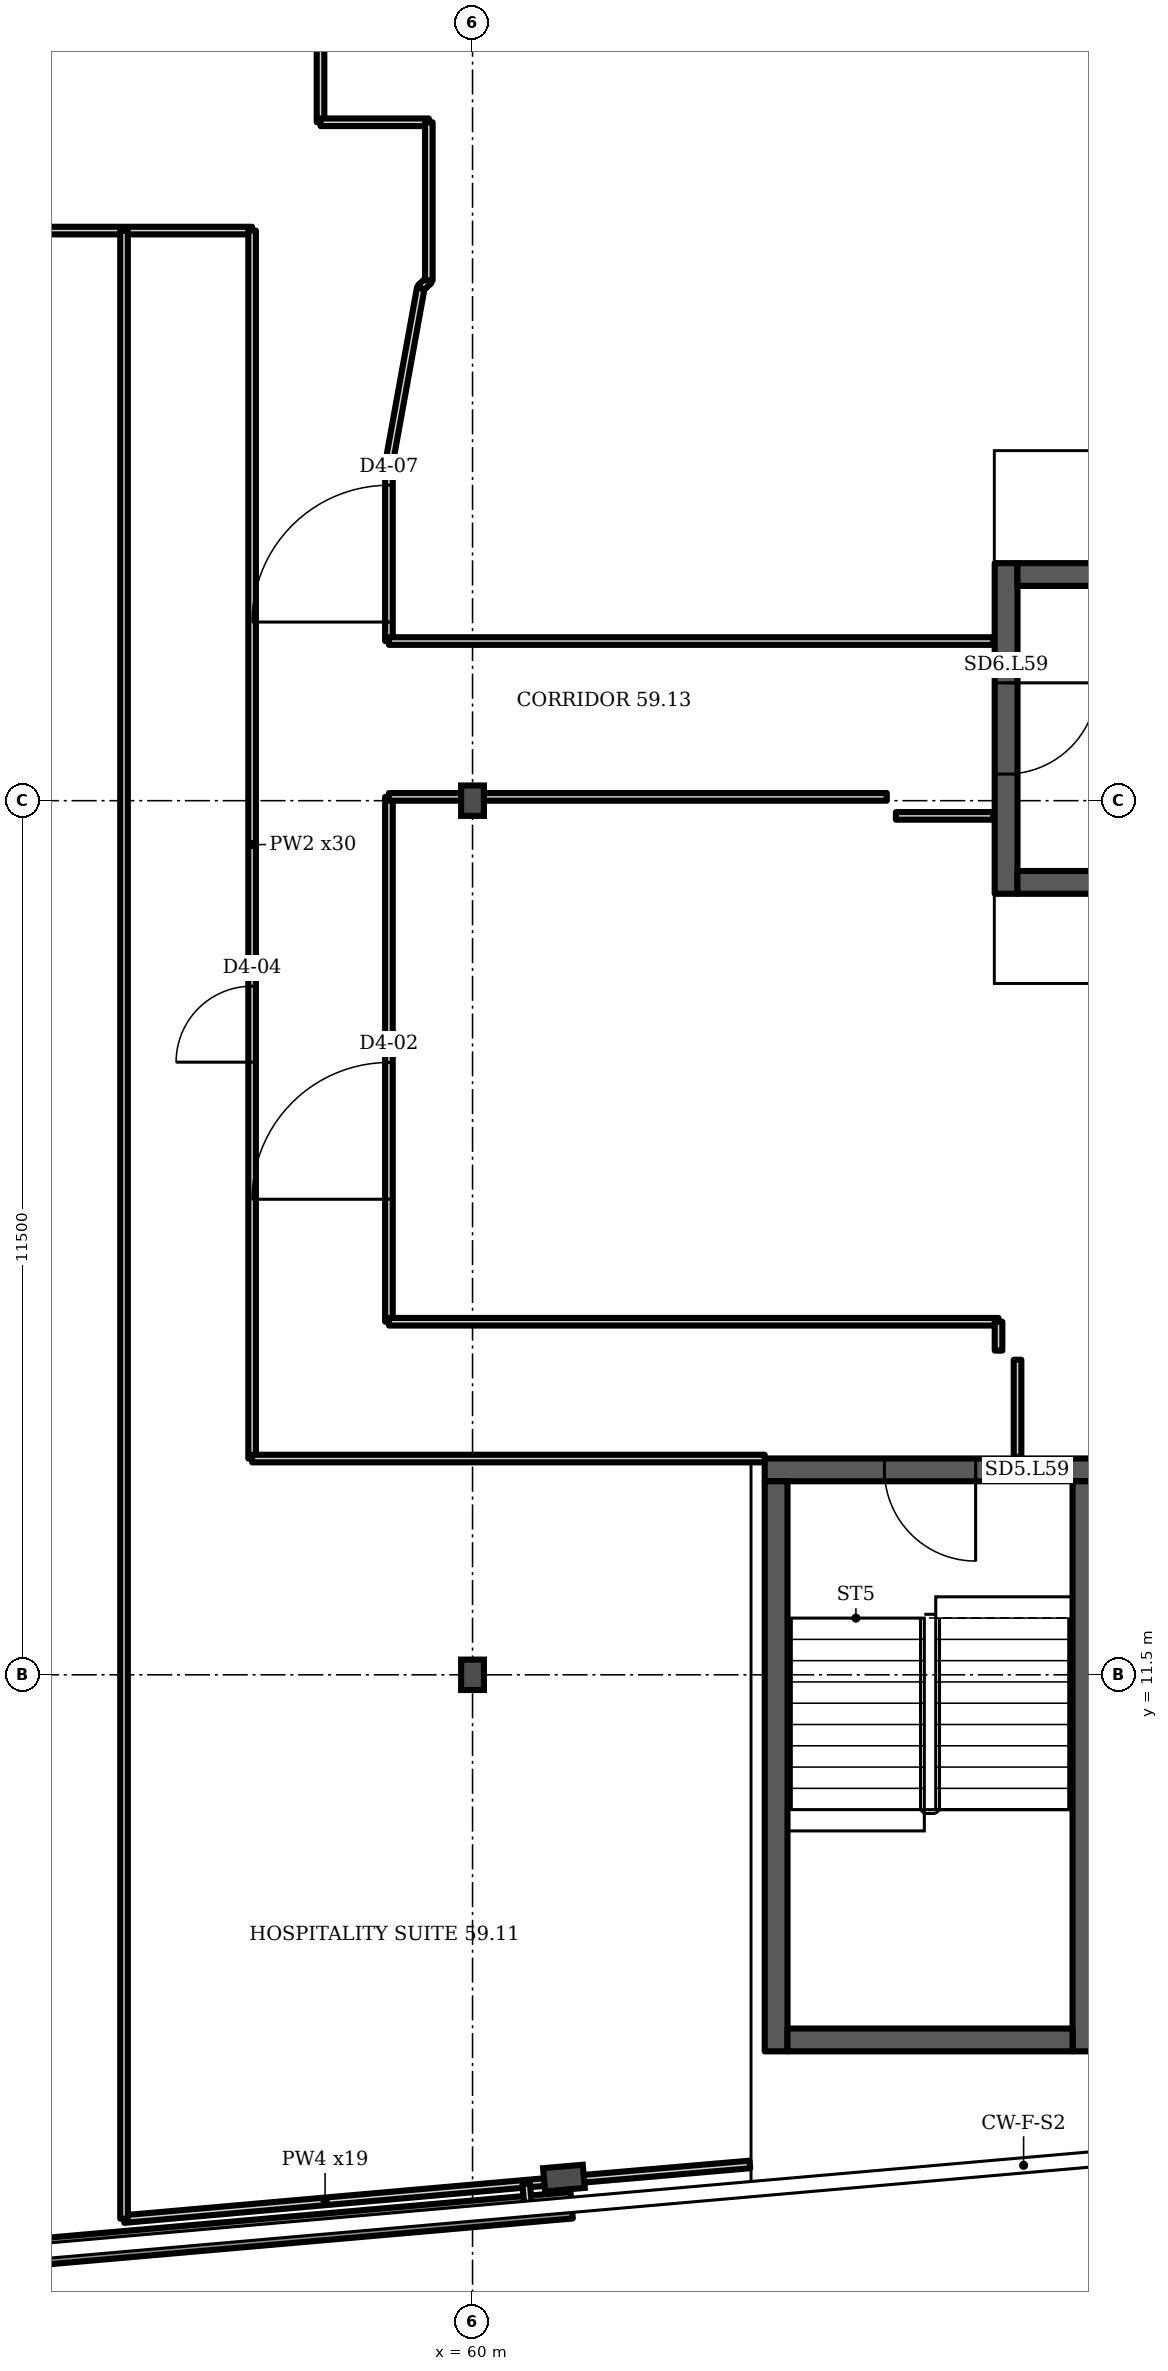
"""IFC4 building model, lengths in metres.
Left out: names, types, materials, properties, quantities, classifications, styles, units other than length and angle.
Written with IfcOpenShell. Run it as: python <this file> out.ifc"""

import sys

from ifc_helpers import new_model, si_unit, direction, frame, frame_2d, origin, origin_2d, place, context, subcontext, project, spatial, rectangle, i_section, extrude, element, fill, save


model = new_model("IFC4")
c1 = context("Model", 3, precision=1e-05, world=origin(), true_north=direction((0.0, 1.0)))
c2 = subcontext(c1, "Body", "Model", "MODEL_VIEW")
j1 = project(units=[si_unit("LENGTHUNIT", "METRE"), si_unit("PLANEANGLEUNIT", "RADIAN")], contexts=[c1])
p1 = place(None, origin())
s1 = spatial("IfcSite", under=j1, at=p1, CompositionType="ELEMENT")
p2 = place(p1, origin())
s2 = spatial("IfcBuilding", under=s1, at=p2, CompositionType="ELEMENT")
p3 = place(p2, frame((0.0, 0.0, 235.9)))
s3 = spatial("IfcBuildingStorey", under=s2, at=p3, CompositionType="ELEMENT", Elevation=235.9)
p4 = place(p3, frame((61.202, 4.879, 0.0), z_axis=(0.0, 0.0, 1.0), x_axis=(0.087156, -0.996197, 0.0)))
e1 = element("IfcColumn", 1, at=p4, inside=s3, PredefinedType="COLUMN", context=c2, shape_type="SweptSolid", body=[
    extrude(i_section(OverallWidth=0.306, OverallDepth=0.524, WebThickness=0.021, FlangeThickness=0.04, FilletRadius=0.027, at=origin_2d()), origin(), (0.0, 0.0, 1.0), 3.6),
])
for number, where, z_axis, x_axis in (
    (2, (60.0, 11.5, 0.0), (0.0, 0.0, 1.0), (1.0, 0.0, 0.0)),
    (3, (60.0, 23.0, 0.0), (0.0, 0.0, 1.0), (1.0, 0.0, 0.0)),
):
    element("IfcColumn", number, at=place(p3, frame(where, z_axis=z_axis, x_axis=x_axis)), inside=s3, PredefinedType="COLUMN", context=c2, shape_type="SweptSolid", body=[
        extrude(i_section(OverallWidth=0.3, OverallDepth=0.4, WebThickness=0.013, FlangeThickness=0.024, FilletRadius=0.027, at=origin_2d()), origin(), (0.0, 0.0, 1.0), 3.6),
    ])
p5 = place(p3, frame((49.545, 3.493, 0.0), z_axis=(0.0, 0.0, 1.0), x_axis=(0.996196, 0.087141, 0.0)))
e4 = element("IfcWall", 4, at=p5, inside=s3, PredefinedType="SOLIDWALL", context=c2, shape_type="SweptSolid", body=[
    extrude(rectangle(XDim=11.803, YDim=0.35, at=frame_2d((5.902, 0.0))), origin(), (0.0, 0.0, 1.0), 1.0),
])
p6 = place(p3, frame((63.844, 14.196, 0.0), z_axis=(0.0, 0.0, 1.0), x_axis=(1.0, 0.0, 0.0)))
e5 = element("IfcWall", 5, at=p6, inside=s3, PredefinedType="SHEAR", context=c2, shape_type="SweptSolid", body=[
    extrude(rectangle(XDim=4.35, YDim=0.3, at=frame_2d((2.175, 0.0))), origin(), (0.0, 0.0, 1.0), 3.2),
])
p7 = place(p6, frame((1.575, 0.0, 0.0)))
e6 = element("IfcOpeningElement", 6, at=p7, cuts=e5, PredefinedType="OPENING", context=c2, shape_type="SweptSolid", body=[
    extrude(rectangle(XDim=1.2, YDim=2.1, at=frame_2d((0.6, 1.05))), frame((0.0, 0.16, 0.0), z_axis=(0.0, -1.0, 0.0), x_axis=(1.0, 0.0, 0.0)), (0.0, 0.0, 1.0), 0.32),
])
p8 = place(p3, frame((67.02, 21.775, 0.0), z_axis=(0.0, 0.0, 1.0), x_axis=(0.0, 1.0, 0.0)))
e7 = element("IfcWall", 7, at=p8, inside=s3, PredefinedType="SHEAR", context=c2, shape_type="SweptSolid", body=[
    extrude(rectangle(XDim=4.35, YDim=0.3, at=frame_2d((2.175, 0.0))), origin(), (0.0, 0.0, 1.0), 3.2),
])
p9 = place(p8, frame((1.575, 0.0, 0.0)))
e8 = element("IfcOpeningElement", 8, at=p9, cuts=e7, PredefinedType="OPENING", context=c2, shape_type="SweptSolid", body=[
    extrude(rectangle(XDim=1.2, YDim=2.1, at=frame_2d((0.6, 1.05))), frame((0.0, 0.16, 0.0), z_axis=(0.0, -1.0, 0.0), x_axis=(1.0, 0.0, 0.0)), (0.0, 0.0, 1.0), 0.32),
])
p10 = place(p3, frame((44.15, 30.5, 0.0), z_axis=(0.0, 0.0, 1.0), x_axis=(1.0, 0.0, 0.0)))
e9 = element("IfcWall", 9, at=p10, inside=s3, PredefinedType="PARTITIONING", context=c2, shape_type="SweptSolid", body=[
    extrude(rectangle(XDim=12.95, YDim=0.1, at=frame_2d((6.475, 0.0))), origin(), (0.0, 0.0, 1.0), 3.2),
])
p11 = place(p10, frame((5.17, 0.0, 0.0)))
e10 = element("IfcOpeningElement", 10, at=p11, cuts=e9, PredefinedType="OPENING", context=c2, shape_type="SweptSolid", body=[
    extrude(rectangle(XDim=1.0, YDim=2.1, at=frame_2d((0.5, 1.05))), frame((0.0, 0.06, 0.0), z_axis=(0.0, -1.0, 0.0), x_axis=(1.0, 0.0, 0.0)), (0.0, 0.0, 1.0), 0.12),
])
p12 = place(p3, frame((55.415, 4.34, 0.0), z_axis=(0.0, 0.0, 1.0), x_axis=(0.996159, 0.087534, 0.0)))
e11 = element("IfcWall", 11, at=p12, inside=s3, PredefinedType="PARTITIONING", context=c2, shape_type="SweptSolid", body=[
    extrude(rectangle(XDim=5.31, YDim=0.1, at=frame_2d((2.655, 0.0))), origin(), (0.0, 0.0, 1.0), 2.58),
])
p13 = place(p3, frame((55.415, 4.345, 0.0), z_axis=(0.0, 0.0, 1.0), x_axis=(0.0, 1.0, 0.0)))
e12 = element("IfcWall", 12, at=p13, inside=s3, PredefinedType="PARTITIONING", context=c2, shape_type="SweptSolid", body=[
    extrude(rectangle(XDim=26.155, YDim=0.1, at=frame_2d((13.078, 0.0))), origin(), (0.0, 0.0, 1.0), 3.2),
])
p14 = place(p3, frame((57.1, 14.345, 0.0), z_axis=(0.0, 0.0, 1.0), x_axis=(0.0, 1.0, 0.0)))
e13 = element("IfcWall", 13, at=p14, inside=s3, PredefinedType="PARTITIONING", context=c2, shape_type="SweptSolid", body=[
    extrude(rectangle(XDim=16.155, YDim=0.1, at=frame_2d((8.078, 0.0))), origin(), (0.0, 0.0, 1.0), 3.2),
])
p15 = place(p14, frame((5.215, 0.0, 0.0)))
e14 = element("IfcOpeningElement", 14, at=p15, cuts=e13, PredefinedType="OPENING", context=c2, shape_type="SweptSolid", body=[
    extrude(rectangle(XDim=1.0, YDim=2.1, at=frame_2d((0.5, 1.05))), frame((0.0, 0.06, 0.0), z_axis=(0.0, -1.0, 0.0), x_axis=(1.0, 0.0, 0.0)), (0.0, 0.0, 1.0), 0.12),
])
p16 = place(p3, frame((57.1, 14.345, 0.0), z_axis=(0.0, 0.0, 1.0), x_axis=(1.0, 0.0, 0.0)))
e15 = element("IfcWall", 15, at=p16, inside=s3, PredefinedType="PARTITIONING", context=c2, shape_type="SweptSolid", body=[
    extrude(rectangle(XDim=6.744, YDim=0.1, at=frame_2d((3.372, 0.0))), origin(), (0.0, 0.0, 1.0), 3.2),
])
p17 = place(p3, frame((58.0, 31.925, 0.0), z_axis=(0.0, 0.0, 1.0), x_axis=(0.0, 1.0, 0.0)))
e16 = element("IfcWall", 16, at=p17, inside=s3, PredefinedType="PARTITIONING", context=c2, shape_type="SweptSolid", body=[
    extrude(rectangle(XDim=2.055, YDim=0.1, at=frame_2d((1.027, 0.0))), origin(), (0.0, 0.0, 1.0), 3.2),
])
p18 = place(p3, frame((58.0, 31.925, 0.0), z_axis=(0.0, 0.0, 1.0), x_axis=(1.0, 0.0, 0.0)))
e17 = element("IfcWall", 17, at=p18, inside=s3, PredefinedType="PARTITIONING", context=c2, shape_type="SweptSolid", body=[
    extrude(rectangle(XDim=1.425, YDim=0.1, at=frame_2d((0.712, 0.0))), origin(), (0.0, 0.0, 1.0), 3.2),
])
p19 = place(p3, frame((58.9, 16.145, 0.0), z_axis=(0.0, 0.0, 1.0), x_axis=(0.0, 1.0, 0.0)))
e18 = element("IfcWall", 18, at=p19, inside=s3, PredefinedType="PARTITIONING", context=c2, shape_type="SweptSolid", body=[
    extrude(rectangle(XDim=6.905, YDim=0.1, at=frame_2d((3.453, 0.0))), origin(), (0.0, 0.0, 1.0), 3.2),
])
p20 = place(p19, frame((1.611, 0.0, 0.0)))
e19 = element("IfcOpeningElement", 19, at=p20, cuts=e18, PredefinedType="OPENING", context=c2, shape_type="SweptSolid", body=[
    extrude(rectangle(XDim=1.8, YDim=2.1, at=frame_2d((0.9, 1.05))), frame((0.0, 0.06, 0.0), z_axis=(0.0, -1.0, 0.0), x_axis=(1.0, 0.0, 0.0)), (0.0, 0.0, 1.0), 0.12),
])
p21 = place(p3, frame((58.9, 16.145, 0.0), z_axis=(0.0, 0.0, 1.0), x_axis=(1.0, 0.0, 0.0)))
e20 = element("IfcWall", 20, at=p21, inside=s3, PredefinedType="PARTITIONING", context=c2, shape_type="SweptSolid", body=[
    extrude(rectangle(XDim=8.02, YDim=0.1, at=frame_2d((4.01, 0.0))), origin(), (0.0, 0.0, 1.0), 3.2),
])
p22 = place(p3, frame((58.9, 23.05, 0.0), z_axis=(0.0, 0.0, 1.0), x_axis=(1.0, 0.0, 0.0)))
e21 = element("IfcWall", 21, at=p22, inside=s3, PredefinedType="PARTITIONING", context=c2, shape_type="SweptSolid", body=[
    extrude(rectangle(XDim=6.55, YDim=0.1, at=frame_2d((3.275, 0.0))), origin(), (0.0, 0.0, 1.0), 3.2),
])
p23 = place(p3, frame((58.9, 25.1, 0.0), z_axis=(0.0, 0.0, 1.0), x_axis=(0.0, 1.0, 0.0)))
e22 = element("IfcWall", 22, at=p23, inside=s3, PredefinedType="PARTITIONING", context=c2, shape_type="SweptSolid", body=[
    extrude(rectangle(XDim=2.335, YDim=0.1, at=frame_2d((1.167, 0.0))), origin(), (0.0, 0.0, 1.0), 3.2),
])
p24 = place(p23, frame((0.25, 0.0, 0.0)))
e23 = element("IfcOpeningElement", 23, at=p24, cuts=e22, PredefinedType="OPENING", context=c2, shape_type="SweptSolid", body=[
    extrude(rectangle(XDim=1.8, YDim=2.1, at=frame_2d((0.9, 1.05))), frame((0.0, 0.06, 0.0), z_axis=(0.0, -1.0, 0.0), x_axis=(1.0, 0.0, 0.0)), (0.0, 0.0, 1.0), 0.12),
])
p25 = place(p3, frame((58.9, 25.1, 0.0), z_axis=(0.0, 0.0, 1.0), x_axis=(1.0, 0.0, 0.0)))
e24 = element("IfcWall", 24, at=p25, inside=s3, PredefinedType="PARTITIONING", context=c2, shape_type="SweptSolid", body=[
    extrude(rectangle(XDim=7.95, YDim=0.1, at=frame_2d((3.975, 0.0))), origin(), (0.0, 0.0, 1.0), 3.2),
])
p26 = place(p3, frame((58.9, 27.435, 0.0), z_axis=(0.0, 0.0, 1.0), x_axis=(0.178584, 0.983924, 0.0)))
e25 = element("IfcWall", 25, at=p26, inside=s3, PredefinedType="PARTITIONING", context=c2, shape_type="SweptSolid", body=[
    extrude(rectangle(XDim=2.353, YDim=0.1, at=frame_2d((1.176, 0.0))), origin(), (0.0, 0.0, 1.0), 3.2),
])
p27 = place(p3, frame((59.32, 29.75, 0.0), z_axis=(0.0, 0.0, 1.0), x_axis=(0.741581, 0.670872, 0.0)))
e26 = element("IfcWall", 26, at=p27, inside=s3, PredefinedType="PARTITIONING", context=c2, shape_type="SweptSolid", body=[
    extrude(rectangle(XDim=0.142, YDim=0.1, at=frame_2d((0.071, 0.0))), origin(), (0.0, 0.0, 1.0), 3.2),
])
p28 = place(p3, frame((59.425, 29.845, 0.0), z_axis=(0.0, 0.0, 1.0), x_axis=(0.0, 1.0, 0.0)))
e27 = element("IfcWall", 27, at=p28, inside=s3, PredefinedType="PARTITIONING", context=c2, shape_type="SweptSolid", body=[
    extrude(rectangle(XDim=2.08, YDim=0.1, at=frame_2d((1.04, 0.0))), origin(), (0.0, 0.0, 1.0), 3.2),
])
p29 = place(p3, frame((60.705, 4.805, 0.0), z_axis=(0.0, 0.0, 1.0), x_axis=(0.996324, 0.085692, 0.0)))
e28 = element("IfcWall", 28, at=p29, inside=s3, PredefinedType="PARTITIONING", context=c2, shape_type="SweptSolid", body=[
    extrude(rectangle(XDim=2.955, YDim=0.1, at=frame_2d((1.477, 0.0))), origin(), (0.0, 0.0, 1.0), 2.58),
])
p30 = place(p3, frame((60.733, 4.497, 0.0), z_axis=(0.0, 0.0, 1.0), x_axis=(-0.090037, 0.995936, 0.0)))
e29 = element("IfcWall", 29, at=p30, inside=s3, PredefinedType="PARTITIONING", context=c2, shape_type="SweptSolid", body=[
    extrude(rectangle(XDim=0.309, YDim=0.1, at=frame_2d((0.155, 0.0))), origin(), (0.0, 0.0, 1.0), 3.2),
])
p31 = place(p3, frame((65.57, 22.8, 0.0), z_axis=(0.0, 0.0, 1.0), x_axis=(1.0, 0.0, 0.0)))
e30 = element("IfcWall", 30, at=p31, inside=s3, PredefinedType="PARTITIONING", context=c2, shape_type="SweptSolid", body=[
    extrude(rectangle(XDim=1.28, YDim=0.1, at=frame_2d((0.64, 0.0))), origin(), (0.0, 0.0, 1.0), 3.2),
])
p32 = place(p3, frame((66.92, 15.765, 0.0), z_axis=(0.0, 0.0, 1.0), x_axis=(0.0, 1.0, 0.0)))
e31 = element("IfcWall", 31, at=p32, inside=s3, PredefinedType="PARTITIONING", context=c2, shape_type="SweptSolid", body=[
    extrude(rectangle(XDim=0.38, YDim=0.1, at=frame_2d((0.19, 0.0))), origin(), (0.0, 0.0, 1.0), 3.2),
])
p33 = place(p3, frame((67.17, 14.366, 0.0), z_axis=(0.0, 0.0, 1.0), x_axis=(0.0, 1.0, 0.0)))
e32 = element("IfcWall", 32, at=p33, inside=s3, PredefinedType="PARTITIONING", context=c2, shape_type="SweptSolid", body=[
    extrude(rectangle(XDim=1.279, YDim=0.1, at=frame_2d((0.639, 0.0))), origin(), (0.0, 0.0, 1.0), 3.2),
])
for number, where, z_axis, x_axis in (
    (33, (63.994, 6.546, 0.0), (0.0, 0.0, 1.0), (0.0, 1.0, 0.0)),
    (34, (68.044, 6.546, 0.0), (0.0, 0.0, 1.0), (0.0, 1.0, 0.0)),
):
    element("IfcWall", number, at=place(p3, frame(where, z_axis=z_axis, x_axis=x_axis)), inside=s3, PredefinedType="SHEAR", context=c2, shape_type="SweptSolid", body=[
        extrude(rectangle(XDim=7.5, YDim=0.3, at=frame_2d((3.75, 0.0))), origin(), (0.0, 0.0, 1.0), 3.2),
    ])
p34 = place(p3, frame((64.144, 6.696, 0.0), z_axis=(0.0, 0.0, 1.0), x_axis=(1.0, 0.0, 0.0)))
e35 = element("IfcWall", 35, at=p34, inside=s3, PredefinedType="SHEAR", context=c2, shape_type="SweptSolid", body=[
    extrude(rectangle(XDim=3.75, YDim=0.3, at=frame_2d((1.875, 0.0))), origin(), (0.0, 0.0, 1.0), 3.2),
])
for number, where, z_axis, x_axis in (
    (36, (67.17, 21.925, 0.0), (0.0, 0.0, 1.0), (1.0, 0.0, 0.0)),
    (37, (67.17, 25.975, 0.0), (0.0, 0.0, 1.0), (1.0, 0.0, 0.0)),
):
    element("IfcWall", number, at=place(p3, frame(where, z_axis=z_axis, x_axis=x_axis)), inside=s3, PredefinedType="SHEAR", context=c2, shape_type="SweptSolid", body=[
        extrude(rectangle(XDim=7.5, YDim=0.3, at=frame_2d((3.75, 0.0))), origin(), (0.0, 0.0, 1.0), 3.2),
    ])
p35 = place(p7, origin())
e38 = element("IfcDoor", 38, at=p35, inside=s3, OperationType="SINGLE_SWING_RIGHT", PredefinedType="DOOR", context=c2, shape_type="SweptSolid", body=[
    extrude(rectangle(XDim=1.2, YDim=2.1, at=frame_2d((0.6, 1.05))), frame((0.0, 0.025, 0.0), z_axis=(0.0, -1.0, 0.0), x_axis=(1.0, 0.0, 0.0)), (0.0, 0.0, 1.0), 0.05),
])
fill(e6, e38)
p36 = place(p9, origin())
e39 = element("IfcDoor", 39, at=p36, inside=s3, OperationType="SINGLE_SWING_RIGHT", PredefinedType="DOOR", context=c2, shape_type="SweptSolid", body=[
    extrude(rectangle(XDim=1.2, YDim=2.1, at=frame_2d((0.6, 1.05))), frame((0.0, 0.025, 0.0), z_axis=(0.0, -1.0, 0.0), x_axis=(1.0, 0.0, 0.0)), (0.0, 0.0, 1.0), 0.05),
])
fill(e8, e39)
p37 = place(p20, origin())
e40 = element("IfcDoor", 40, at=p37, inside=s3, OperationType="DOUBLE_DOOR_SINGLE_SWING", PredefinedType="DOOR", context=c2, shape_type="SweptSolid", body=[
    extrude(rectangle(XDim=1.8, YDim=2.1, at=frame_2d((0.9, 1.05))), frame((0.0, 0.025, 0.0), z_axis=(0.0, -1.0, 0.0), x_axis=(1.0, 0.0, 0.0)), (0.0, 0.0, 1.0), 0.05),
])
fill(e19, e40)
p38 = place(p15, origin())
e41 = element("IfcDoor", 41, at=p38, inside=s3, OperationType="SINGLE_SWING_LEFT", PredefinedType="DOOR", context=c2, shape_type="SweptSolid", body=[
    extrude(rectangle(XDim=1.0, YDim=2.1, at=frame_2d((0.5, 1.05))), frame((0.0, 0.025, 0.0), z_axis=(0.0, -1.0, 0.0), x_axis=(1.0, 0.0, 0.0)), (0.0, 0.0, 1.0), 0.05),
])
fill(e14, e41)
p39 = place(p24, origin())
e42 = element("IfcDoor", 42, at=p39, inside=s3, OperationType="DOUBLE_DOOR_SINGLE_SWING", PredefinedType="DOOR", context=c2, shape_type="SweptSolid", body=[
    extrude(rectangle(XDim=1.8, YDim=2.1, at=frame_2d((0.9, 1.05))), frame((0.0, 0.025, 0.0), z_axis=(0.0, -1.0, 0.0), x_axis=(1.0, 0.0, 0.0)), (0.0, 0.0, 1.0), 0.05),
])
fill(e23, e42)
save(model, sys.argv[1])
